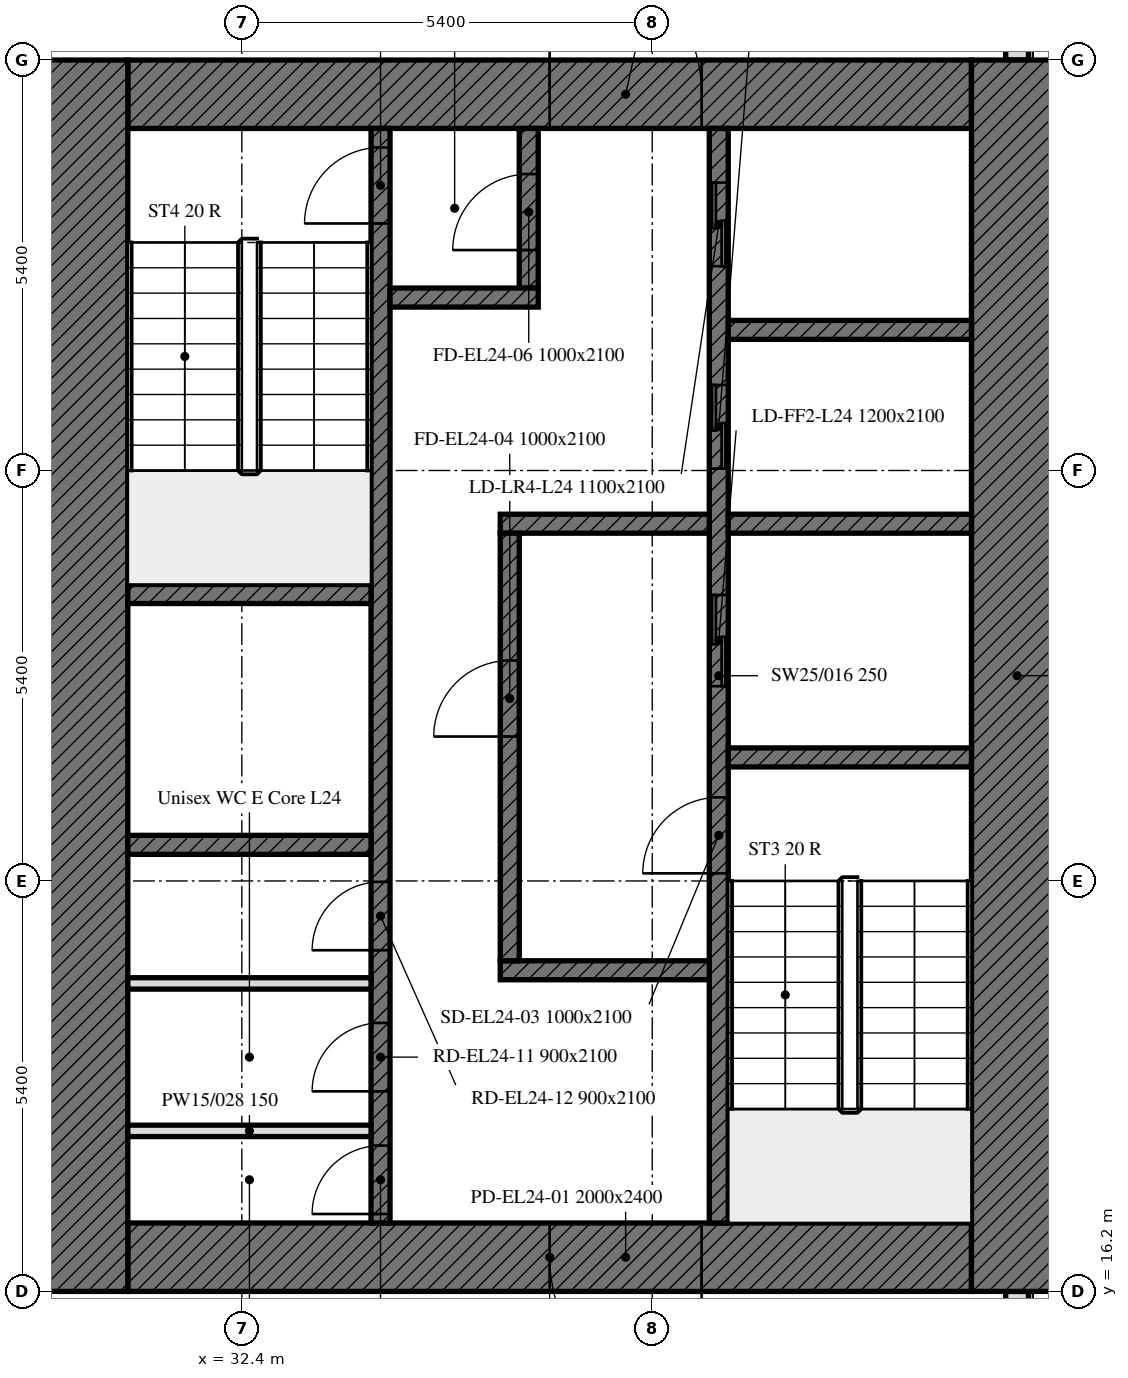
"""IFC4 building model, lengths in metres.
Left out: names, types, materials, properties, quantities, classifications, styles, units other than length and angle.
Written with IfcOpenShell. Run it as: python <this file> out.ifc"""

import sys

from ifc_helpers import new_model, si_unit, direction, frame, frame_2d, origin, place, context, subcontext, project, spatial, rectangle, extrude, element, fill, save


model = new_model("IFC4")
c1 = context("Model", 3, precision=1e-05, world=origin(), true_north=direction((0.0, 1.0)))
c2 = subcontext(c1, "Body", "Model", "MODEL_VIEW")
j1 = project(units=[si_unit("LENGTHUNIT", "METRE"), si_unit("PLANEANGLEUNIT", "RADIAN")], contexts=[c1])
p1 = place(None, origin())
s1 = spatial("IfcSite", under=j1, at=p1, CompositionType="ELEMENT")
p2 = place(p1, origin())
s2 = spatial("IfcBuilding", under=s1, at=p2, CompositionType="ELEMENT")
p3 = place(p2, frame((0.0, 0.0, 103.0)))
s3 = spatial("IfcBuildingStorey", under=s2, at=p3, CompositionType="ELEMENT", Elevation=103.0)
p4 = place(p3, frame((42.6, 10.986, 0.0), z_axis=(0.0, 0.0, 1.0), x_axis=(0.0, 1.0, 0.0)))
e1 = element("IfcWall", 1, at=p4, inside=s3, PredefinedType="SOLIDWALL", context=c2, shape_type="SweptSolid", body=[
    extrude(rectangle(XDim=5.214, YDim=0.3, at=frame_2d((2.607, 0.0))), origin(), (0.0, 0.0, 1.0), 3.5),
])
p5 = place(p4, frame((1.164, 0.0, 0.9)))
e2 = element("IfcOpeningElement", 2, at=p5, cuts=e1, PredefinedType="OPENING", context=c2, shape_type="SweptSolid", body=[
    extrude(rectangle(XDim=1.1, YDim=1.7, at=frame_2d((0.55, 0.85))), frame((0.0, 0.16, 0.0), z_axis=(0.0, -1.0, 0.0), x_axis=(1.0, 0.0, 0.0)), (0.0, 0.0, 1.0), 0.32),
])
p6 = place(p4, frame((2.764, 0.0, 0.9)))
e3 = element("IfcOpeningElement", 3, at=p6, cuts=e1, PredefinedType="OPENING", context=c2, shape_type="SweptSolid", body=[
    extrude(rectangle(XDim=1.1, YDim=1.7, at=frame_2d((0.55, 0.85))), frame((0.0, 0.16, 0.0), z_axis=(0.0, -1.0, 0.0), x_axis=(1.0, 0.0, 0.0)), (0.0, 0.0, 1.0), 0.32),
])
p7 = place(p3, frame((42.6, 32.4, 0.0), z_axis=(0.0, 0.0, 1.0), x_axis=(0.0, 1.0, 0.0)))
e4 = element("IfcWall", 4, at=p7, inside=s3, PredefinedType="SOLIDWALL", context=c2, shape_type="SweptSolid", body=[
    extrude(rectangle(XDim=10.614, YDim=0.3, at=frame_2d((5.307, 0.0))), origin(), (0.0, 0.0, 1.0), 3.5),
])
p8 = place(p7, frame((1.35, 0.0, 0.9)))
e5 = element("IfcOpeningElement", 5, at=p8, cuts=e4, PredefinedType="OPENING", context=c2, shape_type="SweptSolid", body=[
    extrude(rectangle(XDim=1.1, YDim=1.7, at=frame_2d((0.55, 0.85))), frame((0.0, 0.16, 0.0), z_axis=(0.0, -1.0, 0.0), x_axis=(1.0, 0.0, 0.0)), (0.0, 0.0, 1.0), 0.32),
])
p9 = place(p7, frame((2.95, 0.0, 0.9)))
e6 = element("IfcOpeningElement", 6, at=p9, cuts=e4, PredefinedType="OPENING", context=c2, shape_type="SweptSolid", body=[
    extrude(rectangle(XDim=1.1, YDim=1.7, at=frame_2d((0.55, 0.85))), frame((0.0, 0.16, 0.0), z_axis=(0.0, -1.0, 0.0), x_axis=(1.0, 0.0, 0.0)), (0.0, 0.0, 1.0), 0.32),
])
p10 = place(p3, frame((42.0, 16.65, 0.0), z_axis=(0.0, 0.0, 1.0), x_axis=(-1.0, 0.0, 0.0)))
e7 = element("IfcWall", 7, at=p10, inside=s3, PredefinedType="SOLIDWALL", context=c2, shape_type="SweptSolid", body=[
    extrude(rectangle(XDim=11.1, YDim=0.9, at=frame_2d((5.55, 0.0))), origin(), (0.0, 0.0, 1.0), 3.5),
])
p11 = place(p10, frame((3.55, 0.0, 0.0)))
e8 = element("IfcOpeningElement", 8, at=p11, cuts=e7, PredefinedType="OPENING", context=c2, shape_type="SweptSolid", body=[
    extrude(rectangle(XDim=2.0, YDim=2.4, at=frame_2d((1.0, 1.2))), frame((0.0, 0.45, 0.0), z_axis=(0.0, -1.0, 0.0), x_axis=(1.0, 0.0, 0.0)), (0.0, 0.0, 1.0), 0.9),
])
p12 = place(p3, frame((30.9, 31.95, 0.0), z_axis=(0.0, 0.0, 1.0), x_axis=(1.0, 0.0, 0.0)))
e9 = element("IfcWall", 9, at=p12, inside=s3, PredefinedType="SOLIDWALL", context=c2, shape_type="SweptSolid", body=[
    extrude(rectangle(XDim=11.1, YDim=0.9, at=frame_2d((5.55, 0.0))), origin(), (0.0, 0.0, 1.0), 3.5),
])
p13 = place(p12, frame((5.55, 0.0, 0.0)))
e10 = element("IfcOpeningElement", 10, at=p13, cuts=e9, PredefinedType="OPENING", context=c2, shape_type="SweptSolid", body=[
    extrude(rectangle(XDim=2.0, YDim=2.4, at=frame_2d((1.0, 1.2))), frame((0.0, 0.45, 0.0), z_axis=(0.0, -1.0, 0.0), x_axis=(1.0, 0.0, 0.0)), (0.0, 0.0, 1.0), 0.9),
])
for number, where, z_axis, x_axis in (
    (11, (42.6, 32.4, 0.0), (0.0, 0.0, 1.0), (0.0, -1.0, 0.0)),
    (12, (30.3, 16.2, 0.0), (0.0, 0.0, 1.0), (0.0, 1.0, 0.0)),
):
    element("IfcWall", number, at=place(p3, frame(where, z_axis=z_axis, x_axis=x_axis)), inside=s3, PredefinedType="SOLIDWALL", context=c2, shape_type="SweptSolid", body=[
        extrude(rectangle(XDim=16.2, YDim=1.2, at=frame_2d((8.1, 0.0))), origin(), (0.0, 0.0, 1.0), 3.5),
    ])
p14 = place(p3, frame((38.675, 17.1, 0.0), z_axis=(0.0, 0.0, 1.0), x_axis=(0.0, 1.0, 0.0)))
e13 = element("IfcWall", 13, at=p14, inside=s3, PredefinedType="SOLIDWALL", context=c2, shape_type="SweptSolid", body=[
    extrude(rectangle(XDim=14.4, YDim=0.25, at=frame_2d((7.2, 0.0))), origin(), (0.0, 0.0, 1.0), 3.5),
])
p15 = place(p14, frame((4.6, 0.0, 0.0)))
e14 = element("IfcOpeningElement", 14, at=p15, cuts=e13, PredefinedType="OPENING", context=c2, shape_type="SweptSolid", body=[
    extrude(rectangle(XDim=1.0, YDim=2.1, at=frame_2d((0.5, 1.05))), frame((0.0, 0.125, 0.0), z_axis=(0.0, -1.0, 0.0), x_axis=(1.0, 0.0, 0.0)), (0.0, 0.0, 1.0), 0.25),
])
p16 = place(p14, frame((7.062, 0.0, 0.0)))
e15 = element("IfcOpeningElement", 15, at=p16, cuts=e13, PredefinedType="OPENING", context=c2, shape_type="SweptSolid", body=[
    extrude(rectangle(XDim=1.2, YDim=2.1, at=frame_2d((0.6, 1.05))), frame((0.0, 0.125, 0.0), z_axis=(0.0, -1.0, 0.0), x_axis=(1.0, 0.0, 0.0)), (0.0, 0.0, 1.0), 0.25),
])
p17 = place(p14, frame((9.925, 0.0, 0.0)))
e16 = element("IfcOpeningElement", 16, at=p17, cuts=e13, PredefinedType="OPENING", context=c2, shape_type="SweptSolid", body=[
    extrude(rectangle(XDim=1.1, YDim=2.1, at=frame_2d((0.55, 1.05))), frame((0.0, 0.125, 0.0), z_axis=(0.0, -1.0, 0.0), x_axis=(1.0, 0.0, 0.0)), (0.0, 0.0, 1.0), 0.25),
])
p18 = place(p14, frame((12.587, 0.0, 0.0)))
e17 = element("IfcOpeningElement", 17, at=p18, cuts=e13, PredefinedType="OPENING", context=c2, shape_type="SweptSolid", body=[
    extrude(rectangle(XDim=1.1, YDim=2.1, at=frame_2d((0.55, 1.05))), frame((0.0, 0.125, 0.0), z_axis=(0.0, -1.0, 0.0), x_axis=(1.0, 0.0, 0.0)), (0.0, 0.0, 1.0), 0.25),
])
p19 = place(p3, frame((34.225, 17.1, 0.0), z_axis=(0.0, 0.0, 1.0), x_axis=(0.0, 1.0, 0.0)))
e18 = element("IfcWall", 18, at=p19, inside=s3, PredefinedType="SOLIDWALL", context=c2, shape_type="SweptSolid", body=[
    extrude(rectangle(XDim=14.4, YDim=0.25, at=frame_2d((7.2, 0.0))), origin(), (0.0, 0.0, 1.0), 3.5),
])
p20 = place(p19, frame((13.15, 0.0, 0.0)))
e19 = element("IfcOpeningElement", 19, at=p20, cuts=e18, PredefinedType="OPENING", context=c2, shape_type="SweptSolid", body=[
    extrude(rectangle(XDim=1.0, YDim=2.1, at=frame_2d((0.5, 1.05))), frame((0.0, 0.125, 0.0), z_axis=(0.0, -1.0, 0.0), x_axis=(1.0, 0.0, 0.0)), (0.0, 0.0, 1.0), 0.25),
])
p21 = place(p19, frame((0.118, 0.0, 0.0)))
e20 = element("IfcOpeningElement", 20, at=p21, cuts=e18, PredefinedType="OPENING", context=c2, shape_type="SweptSolid", body=[
    extrude(rectangle(XDim=0.9, YDim=2.1, at=frame_2d((0.45, 1.05))), frame((0.0, 0.125, 0.0), z_axis=(0.0, -1.0, 0.0), x_axis=(1.0, 0.0, 0.0)), (0.0, 0.0, 1.0), 0.25),
])
p22 = place(p19, frame((1.732, 0.0, 0.0)))
e21 = element("IfcOpeningElement", 21, at=p22, cuts=e18, PredefinedType="OPENING", context=c2, shape_type="SweptSolid", body=[
    extrude(rectangle(XDim=0.9, YDim=2.1, at=frame_2d((0.45, 1.05))), frame((0.0, 0.125, 0.0), z_axis=(0.0, -1.0, 0.0), x_axis=(1.0, 0.0, 0.0)), (0.0, 0.0, 1.0), 0.25),
])
p23 = place(p19, frame((3.588, 0.0, 0.0)))
e22 = element("IfcOpeningElement", 22, at=p23, cuts=e18, PredefinedType="OPENING", context=c2, shape_type="SweptSolid", body=[
    extrude(rectangle(XDim=0.9, YDim=2.1, at=frame_2d((0.45, 1.05))), frame((0.0, 0.125, 0.0), z_axis=(0.0, -1.0, 0.0), x_axis=(1.0, 0.0, 0.0)), (0.0, 0.0, 1.0), 0.25),
])
p24 = place(p3, frame((38.8, 23.225, 0.0), z_axis=(0.0, 0.0, 1.0), x_axis=(1.0, 0.0, 0.0)))
e23 = element("IfcWall", 23, at=p24, inside=s3, PredefinedType="SOLIDWALL", context=c2, shape_type="SweptSolid", body=[
    extrude(rectangle(XDim=3.2, YDim=0.25, at=frame_2d((1.6, 0.0))), origin(), (0.0, 0.0, 1.0), 3.5),
])
for number, where, z_axis, x_axis in (
    (24, (30.9, 25.375, 0.0), (0.0, 0.0, 1.0), (1.0, 0.0, 0.0)),
    (25, (30.9, 22.075, 0.0), (0.0, 0.0, 1.0), (1.0, 0.0, 0.0)),
):
    element("IfcWall", number, at=place(p3, frame(where, z_axis=z_axis, x_axis=x_axis)), inside=s3, PredefinedType="SOLIDWALL", context=c2, shape_type="SweptSolid", body=[
        extrude(rectangle(XDim=3.2, YDim=0.25, at=frame_2d((1.6, 0.0))), origin(), (0.0, 0.0, 1.0), 3.5),
    ])
p25 = place(p3, frame((38.8, 26.3, 0.0), z_axis=(0.0, 0.0, 1.0), x_axis=(1.0, 0.0, 0.0)))
e26 = element("IfcWall", 26, at=p25, inside=s3, PredefinedType="SOLIDWALL", context=c2, shape_type="SweptSolid", body=[
    extrude(rectangle(XDim=3.2, YDim=0.25, at=frame_2d((1.6, 0.0))), origin(), (0.0, 0.0, 1.0), 3.5),
])
for number, where, z_axis, x_axis in (
    (27, (35.8, 26.3, 0.0), (0.0, 0.0, 1.0), (1.0, 0.0, 0.0)),
    (28, (35.8, 20.425, 0.0), (0.0, 0.0, 1.0), (1.0, 0.0, 0.0)),
):
    element("IfcWall", number, at=place(p3, frame(where, z_axis=z_axis, x_axis=x_axis)), inside=s3, PredefinedType="SOLIDWALL", context=c2, shape_type="SweptSolid", body=[
        extrude(rectangle(XDim=2.75, YDim=0.25, at=frame_2d((1.375, 0.0))), origin(), (0.0, 0.0, 1.0), 3.5),
    ])
p26 = place(p3, frame((36.175, 29.4, 0.0), z_axis=(0.0, 0.0, 1.0), x_axis=(0.0, 1.0, 0.0)))
e29 = element("IfcWall", 29, at=p26, inside=s3, PredefinedType="SOLIDWALL", context=c2, shape_type="SweptSolid", body=[
    extrude(rectangle(XDim=2.1, YDim=0.25, at=frame_2d((1.05, 0.0))), origin(), (0.0, 0.0, 1.0), 3.5),
])
p27 = place(p26, frame((0.5, 0.0, 0.0)))
e30 = element("IfcOpeningElement", 30, at=p27, cuts=e29, PredefinedType="OPENING", context=c2, shape_type="SweptSolid", body=[
    extrude(rectangle(XDim=1.0, YDim=2.1, at=frame_2d((0.5, 1.05))), frame((0.0, 0.125, 0.0), z_axis=(0.0, -1.0, 0.0), x_axis=(1.0, 0.0, 0.0)), (0.0, 0.0, 1.0), 0.25),
])
p28 = place(p3, frame((34.35, 29.275, 0.0), z_axis=(0.0, 0.0, 1.0), x_axis=(1.0, 0.0, 0.0)))
e31 = element("IfcWall", 31, at=p28, inside=s3, PredefinedType="SOLIDWALL", context=c2, shape_type="SweptSolid", body=[
    extrude(rectangle(XDim=1.95, YDim=0.25, at=frame_2d((0.975, 0.0))), origin(), (0.0, 0.0, 1.0), 3.5),
])
p29 = place(p3, frame((35.925, 20.55, 0.0), z_axis=(0.0, 0.0, 1.0), x_axis=(0.0, 1.0, 0.0)))
e32 = element("IfcWall", 32, at=p29, inside=s3, PredefinedType="SOLIDWALL", context=c2, shape_type="SweptSolid", body=[
    extrude(rectangle(XDim=5.625, YDim=0.25, at=frame_2d((2.812, 0.0))), origin(), (0.0, 0.0, 1.0), 3.5),
])
p30 = place(p29, frame((2.95, 0.0, 0.0)))
e33 = element("IfcOpeningElement", 33, at=p30, cuts=e32, PredefinedType="OPENING", context=c2, shape_type="SweptSolid", body=[
    extrude(rectangle(XDim=1.0, YDim=2.1, at=frame_2d((0.5, 1.05))), frame((0.0, 0.125, 0.0), z_axis=(0.0, -1.0, 0.0), x_axis=(1.0, 0.0, 0.0)), (0.0, 0.0, 1.0), 0.25),
])
p31 = place(p3, frame((38.8, 28.85, 0.0), z_axis=(0.0, 0.0, 1.0), x_axis=(1.0, 0.0, 0.0)))
e34 = element("IfcWall", 34, at=p31, inside=s3, PredefinedType="SOLIDWALL", context=c2, shape_type="SweptSolid", body=[
    extrude(rectangle(XDim=3.2, YDim=0.25, at=frame_2d((1.6, 0.0))), origin(), (0.0, 0.0, 1.0), 3.5),
])
for number, where, z_axis, x_axis in (
    (35, (30.9, 18.312, 0.0), (0.0, 0.0, 1.0), (1.0, 0.0, 0.0)),
    (36, (30.9, 20.252, 0.0), (0.0, 0.0, 1.0), (1.0, 0.0, 0.0)),
):
    element("IfcWall", number, at=place(p3, frame(where, z_axis=z_axis, x_axis=x_axis)), inside=s3, PredefinedType="PARTITIONING", context=c2, shape_type="SweptSolid", body=[
        extrude(rectangle(XDim=3.2, YDim=0.15, at=frame_2d((1.6, 0.0))), origin(), (0.0, 0.0, 1.0), 3.5),
    ])
p32 = place(p11, origin())
e37 = element("IfcDoor", 37, at=p32, inside=s3, OperationType="DOUBLE_DOOR_SINGLE_SWING", PredefinedType="DOOR", context=c2, shape_type="SweptSolid", body=[
    extrude(rectangle(XDim=2.0, YDim=2.4, at=frame_2d((1.0, 1.2))), frame((0.0, 0.025, 0.0), z_axis=(0.0, -1.0, 0.0), x_axis=(1.0, 0.0, 0.0)), (0.0, 0.0, 1.0), 0.05),
])
fill(e8, e37)
p33 = place(p13, origin())
e38 = element("IfcDoor", 38, at=p33, inside=s3, OperationType="DOUBLE_DOOR_SINGLE_SWING", PredefinedType="DOOR", context=c2, shape_type="SweptSolid", body=[
    extrude(rectangle(XDim=2.0, YDim=2.4, at=frame_2d((1.0, 1.2))), frame((0.0, 0.025, 0.0), z_axis=(0.0, -1.0, 0.0), x_axis=(1.0, 0.0, 0.0)), (0.0, 0.0, 1.0), 0.05),
])
fill(e10, e38)
p34 = place(p15, origin())
e39 = element("IfcDoor", 39, at=p34, inside=s3, OperationType="SINGLE_SWING_LEFT", PredefinedType="DOOR", context=c2, shape_type="SweptSolid", body=[
    extrude(rectangle(XDim=1.0, YDim=2.1, at=frame_2d((0.5, 1.05))), frame((0.0, 0.025, 0.0), z_axis=(0.0, -1.0, 0.0), x_axis=(1.0, 0.0, 0.0)), (0.0, 0.0, 1.0), 0.05),
])
fill(e14, e39)
p35 = place(p30, origin())
e40 = element("IfcDoor", 40, at=p35, inside=s3, OperationType="SINGLE_SWING_LEFT", PredefinedType="DOOR", context=c2, shape_type="SweptSolid", body=[
    extrude(rectangle(XDim=1.0, YDim=2.1, at=frame_2d((0.5, 1.05))), frame((0.0, 0.025, 0.0), z_axis=(0.0, -1.0, 0.0), x_axis=(1.0, 0.0, 0.0)), (0.0, 0.0, 1.0), 0.05),
])
fill(e33, e40)
p36 = place(p20, origin())
e41 = element("IfcDoor", 41, at=p36, inside=s3, OperationType="SINGLE_SWING_LEFT", PredefinedType="DOOR", context=c2, shape_type="SweptSolid", body=[
    extrude(rectangle(XDim=1.0, YDim=2.1, at=frame_2d((0.5, 1.05))), frame((0.0, 0.025, 0.0), z_axis=(0.0, -1.0, 0.0), x_axis=(1.0, 0.0, 0.0)), (0.0, 0.0, 1.0), 0.05),
])
fill(e19, e41)
p37 = place(p27, origin())
e42 = element("IfcDoor", 42, at=p37, inside=s3, OperationType="SINGLE_SWING_LEFT", PredefinedType="DOOR", context=c2, shape_type="SweptSolid", body=[
    extrude(rectangle(XDim=1.0, YDim=2.1, at=frame_2d((0.5, 1.05))), frame((0.0, 0.025, 0.0), z_axis=(0.0, -1.0, 0.0), x_axis=(1.0, 0.0, 0.0)), (0.0, 0.0, 1.0), 0.05),
])
fill(e30, e42)
p38 = place(p16, origin())
e43 = element("IfcDoor", 43, at=p38, inside=s3, OperationType="DOUBLE_DOOR_SLIDING", PredefinedType="DOOR", context=c2, shape_type="SweptSolid", body=[
    extrude(rectangle(XDim=1.2, YDim=2.1, at=frame_2d((0.6, 1.05))), frame((0.0, 0.025, 0.0), z_axis=(0.0, -1.0, 0.0), x_axis=(1.0, 0.0, 0.0)), (0.0, 0.0, 1.0), 0.05),
])
fill(e15, e43)
p39 = place(p17, origin())
e44 = element("IfcDoor", 44, at=p39, inside=s3, OperationType="DOUBLE_DOOR_SLIDING", PredefinedType="DOOR", context=c2, shape_type="SweptSolid", body=[
    extrude(rectangle(XDim=1.1, YDim=2.1, at=frame_2d((0.55, 1.05))), frame((0.0, 0.025, 0.0), z_axis=(0.0, -1.0, 0.0), x_axis=(1.0, 0.0, 0.0)), (0.0, 0.0, 1.0), 0.05),
])
fill(e16, e44)
p40 = place(p18, origin())
e45 = element("IfcDoor", 45, at=p40, inside=s3, OperationType="DOUBLE_DOOR_SLIDING", PredefinedType="DOOR", context=c2, shape_type="SweptSolid", body=[
    extrude(rectangle(XDim=1.1, YDim=2.1, at=frame_2d((0.55, 1.05))), frame((0.0, 0.025, 0.0), z_axis=(0.0, -1.0, 0.0), x_axis=(1.0, 0.0, 0.0)), (0.0, 0.0, 1.0), 0.05),
])
fill(e17, e45)
p41 = place(p21, origin())
e46 = element("IfcDoor", 46, at=p41, inside=s3, OperationType="SINGLE_SWING_LEFT", PredefinedType="DOOR", context=c2, shape_type="SweptSolid", body=[
    extrude(rectangle(XDim=0.9, YDim=2.1, at=frame_2d((0.45, 1.05))), frame((0.0, 0.025, 0.0), z_axis=(0.0, -1.0, 0.0), x_axis=(1.0, 0.0, 0.0)), (0.0, 0.0, 1.0), 0.05),
])
fill(e20, e46)
p42 = place(p22, origin())
e47 = element("IfcDoor", 47, at=p42, inside=s3, OperationType="SINGLE_SWING_LEFT", PredefinedType="DOOR", context=c2, shape_type="SweptSolid", body=[
    extrude(rectangle(XDim=0.9, YDim=2.1, at=frame_2d((0.45, 1.05))), frame((0.0, 0.025, 0.0), z_axis=(0.0, -1.0, 0.0), x_axis=(1.0, 0.0, 0.0)), (0.0, 0.0, 1.0), 0.05),
])
fill(e21, e47)
p43 = place(p23, origin())
e48 = element("IfcDoor", 48, at=p43, inside=s3, OperationType="SINGLE_SWING_LEFT", PredefinedType="DOOR", context=c2, shape_type="SweptSolid", body=[
    extrude(rectangle(XDim=0.9, YDim=2.1, at=frame_2d((0.45, 1.05))), frame((0.0, 0.025, 0.0), z_axis=(0.0, -1.0, 0.0), x_axis=(1.0, 0.0, 0.0)), (0.0, 0.0, 1.0), 0.05),
])
fill(e22, e48)
save(model, sys.argv[1])
